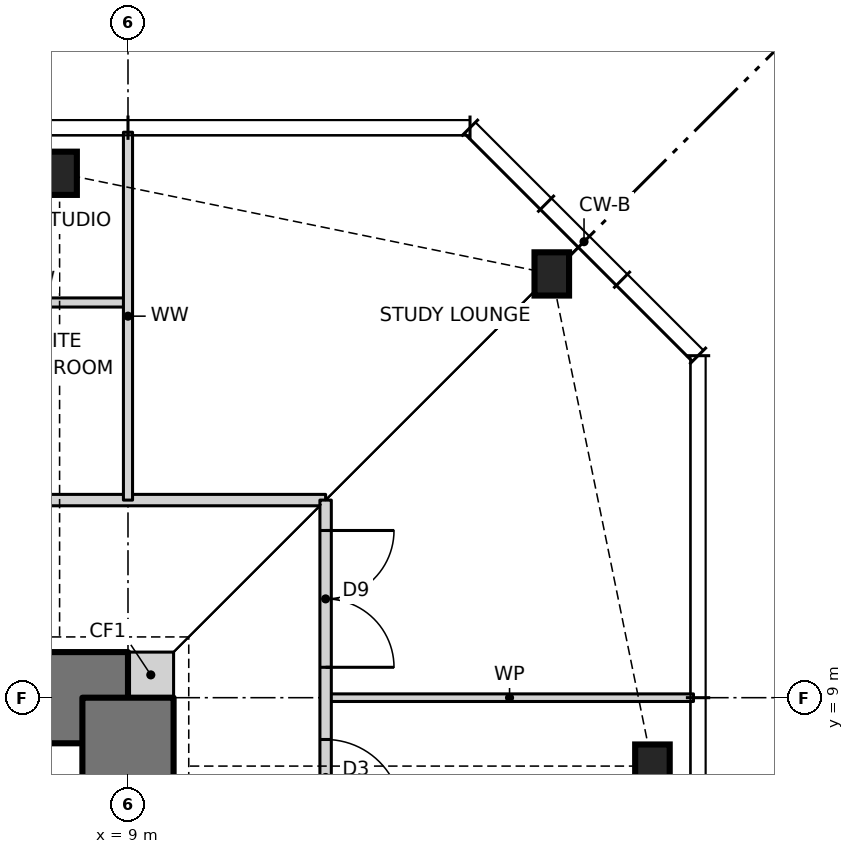
"""IFC4 building model, lengths in metres.
Left out: names, types, materials, properties, quantities, classifications, styles, units other than length and angle.
Written with IfcOpenShell. Run it as: python <this file> out.ifc"""

import sys

from ifc_helpers import new_model, si_unit, direction, frame, frame_2d, origin, origin_2d, place, context, subcontext, project, spatial, rectangle, i_section, extrude, element, fill, save


model = new_model("IFC4")
c1 = context("Model", 3, precision=1e-05, world=origin(), true_north=direction((0.0, 1.0)))
c2 = subcontext(c1, "Body", "Model", "MODEL_VIEW")
j1 = project(units=[si_unit("LENGTHUNIT", "METRE"), si_unit("PLANEANGLEUNIT", "RADIAN")], contexts=[c1])
p1 = place(None, origin())
s1 = spatial("IfcSite", under=j1, at=p1, CompositionType="ELEMENT")
p2 = place(p1, origin())
s2 = spatial("IfcBuilding", under=s1, at=p2, CompositionType="ELEMENT")
p3 = place(p2, frame((0.0, 0.0, 222.0)))
s3 = spatial("IfcBuildingStorey", under=s2, at=p3, CompositionType="ELEMENT", Elevation=222.0)
for number, where, z_axis, x_axis in (
    (1, (15.9, 8.1, 0.0), (0.0, 0.0, 1.0), (1.0, 0.0, 0.0)),
    (2, (14.576, 14.576, 0.0), (0.0, 0.0, 1.0), (1.0, 0.0, 0.0)),
    (3, (8.1, 15.9, 0.0), (0.0, 0.0, 1.0), (1.0, 0.0, 0.0)),
):
    element("IfcColumn", number, at=place(p3, frame(where, z_axis=z_axis, x_axis=x_axis)), inside=s3, PredefinedType="COLUMN", context=c2, shape_type="SweptSolid", body=[
        extrude(i_section(OverallWidth=0.455, OverallDepth=0.569, WebThickness=0.078, FlangeThickness=0.125, at=origin_2d()), origin(), (0.0, 0.0, 1.0), 3.5),
    ])
p4 = place(p3, frame((9.0, 9.3, 0.0), z_axis=(0.0, 0.0, 1.0), x_axis=(1.0, 0.0, 0.0)))
e4 = element("IfcWall", 4, at=p4, inside=s3, PredefinedType="SOLIDWALL", context=c2, shape_type="SweptSolid", body=[
    extrude(rectangle(XDim=0.6, YDim=0.6, at=frame_2d((0.3, 0.0))), origin(), (0.0, 0.0, 1.0), 3.5),
])
p5 = place(p3, frame((9.0, 9.0, 0.0), z_axis=(0.0, 0.0, 1.0), x_axis=(-1.0, 0.0, 0.0)))
e5 = element("IfcWall", 5, at=p5, inside=s3, PredefinedType="SHEAR", context=c2, shape_type="SweptSolid", body=[
    extrude(rectangle(XDim=18.0, YDim=1.2, at=frame_2d((9.0, 0.0))), origin(), (0.0, 0.0, 1.0), 3.5),
])
p6 = place(p5, frame((11.125, 0.0, 0.0)))
e6 = element("IfcOpeningElement", 6, at=p6, cuts=e5, PredefinedType="OPENING", context=c2, shape_type="SweptSolid", body=[
    extrude(rectangle(XDim=0.9, YDim=2.1, at=frame_2d((0.45, 1.05))), frame((0.0, 0.61, 0.0), z_axis=(0.0, -1.0, 0.0), x_axis=(1.0, 0.0, 0.0)), (0.0, 0.0, 1.0), 1.22),
])
p7 = place(p5, frame((4.275, 0.0, 0.0)))
e7 = element("IfcOpeningElement", 7, at=p7, cuts=e5, PredefinedType="OPENING", context=c2, shape_type="SweptSolid", body=[
    extrude(rectangle(XDim=0.9, YDim=2.1, at=frame_2d((0.45, 1.05))), frame((0.0, 0.61, 0.0), z_axis=(0.0, -1.0, 0.0), x_axis=(1.0, 0.0, 0.0)), (0.0, 0.0, 1.0), 1.22),
])
p8 = place(p3, frame((9.0, -9.0, 0.0), z_axis=(0.0, 0.0, 1.0), x_axis=(0.0, 1.0, 0.0)))
e8 = element("IfcWall", 8, at=p8, inside=s3, PredefinedType="SHEAR", context=c2, shape_type="SweptSolid", body=[
    extrude(rectangle(XDim=18.0, YDim=1.2, at=frame_2d((9.0, 0.0))), origin(), (0.0, 0.0, 1.0), 3.5),
])
p9 = place(p8, frame((8.5, 0.0, 0.0)))
e9 = element("IfcOpeningElement", 9, at=p9, cuts=e8, PredefinedType="OPENING", context=c2, shape_type="SweptSolid", body=[
    extrude(rectangle(XDim=1.0, YDim=2.1, at=frame_2d((0.5, 1.05))), frame((0.0, 0.61, 0.0), z_axis=(0.0, -1.0, 0.0), x_axis=(1.0, 0.0, 0.0)), (0.0, 0.0, 1.0), 1.22),
])
p10 = place(p3, frame((11.6, 9.0, 0.0), z_axis=(0.0, 0.0, 1.0), x_axis=(1.0, 0.0, 0.0)))
e10 = element("IfcWall", 10, at=p10, inside=s3, PredefinedType="PARTITIONING", context=c2, shape_type="SweptSolid", body=[
    extrude(rectangle(XDim=4.84, YDim=0.1, at=frame_2d((2.42, 0.0))), origin(), (0.0, 0.0, 1.0), 3.27),
])
p11 = place(p3, frame((-11.6, 11.6, 0.0), z_axis=(0.0, 0.0, 1.0), x_axis=(1.0, 0.0, 0.0)))
e11 = element("IfcWall", 11, at=p11, inside=s3, PredefinedType="PARTITIONING", context=c2, shape_type="SweptSolid", body=[
    extrude(rectangle(XDim=23.2, YDim=0.15, at=frame_2d((11.6, 0.0))), origin(), (0.0, 0.0, 1.0), 3.27),
])
p12 = place(p11, frame((16.65, 0.0, 0.0)))
e12 = element("IfcOpeningElement", 12, at=p12, cuts=e11, PredefinedType="OPENING", context=c2, shape_type="SweptSolid", body=[
    extrude(rectangle(XDim=1.0, YDim=2.1, at=frame_2d((0.5, 1.05))), frame((0.0, 0.085, 0.0), z_axis=(0.0, -1.0, 0.0), x_axis=(1.0, 0.0, 0.0)), (0.0, 0.0, 1.0), 0.17),
])
p13 = place(p11, frame((14.55, 0.0, 0.0)))
e13 = element("IfcOpeningElement", 13, at=p13, cuts=e11, PredefinedType="OPENING", context=c2, shape_type="SweptSolid", body=[
    extrude(rectangle(XDim=1.0, YDim=2.1, at=frame_2d((0.5, 1.05))), frame((0.0, 0.085, 0.0), z_axis=(0.0, -1.0, 0.0), x_axis=(1.0, 0.0, 0.0)), (0.0, 0.0, 1.0), 0.17),
])
p14 = place(p11, frame((7.65, 0.0, 0.0)))
e14 = element("IfcOpeningElement", 14, at=p14, cuts=e11, PredefinedType="OPENING", context=c2, shape_type="SweptSolid", body=[
    extrude(rectangle(XDim=1.0, YDim=2.1, at=frame_2d((0.5, 1.05))), frame((0.0, 0.085, 0.0), z_axis=(0.0, -1.0, 0.0), x_axis=(1.0, 0.0, 0.0)), (0.0, 0.0, 1.0), 0.17),
])
p15 = place(p11, frame((5.55, 0.0, 0.0)))
e15 = element("IfcOpeningElement", 15, at=p15, cuts=e11, PredefinedType="OPENING", context=c2, shape_type="SweptSolid", body=[
    extrude(rectangle(XDim=1.0, YDim=2.1, at=frame_2d((0.5, 1.05))), frame((0.0, 0.085, 0.0), z_axis=(0.0, -1.0, 0.0), x_axis=(1.0, 0.0, 0.0)), (0.0, 0.0, 1.0), 0.17),
])
p16 = place(p11, frame((0.4, 0.0, 0.0)))
e16 = element("IfcOpeningElement", 16, at=p16, cuts=e11, PredefinedType="OPENING", context=c2, shape_type="SweptSolid", body=[
    extrude(rectangle(XDim=1.8, YDim=2.1, at=frame_2d((0.9, 1.05))), frame((0.0, 0.085, 0.0), z_axis=(0.0, -1.0, 0.0), x_axis=(1.0, 0.0, 0.0)), (0.0, 0.0, 1.0), 0.17),
])
p17 = place(p3, frame((6.6, 14.2, 0.0), z_axis=(0.0, 0.0, 1.0), x_axis=(1.0, 0.0, 0.0)))
e17 = element("IfcWall", 17, at=p17, inside=s3, PredefinedType="PARTITIONING", context=c2, shape_type="SweptSolid", body=[
    extrude(rectangle(XDim=2.4, YDim=0.12, at=frame_2d((1.2, 0.0))), origin(), (0.0, 0.0, 1.0), 3.27),
])
p18 = place(p3, frame((11.6, -11.6, 0.0), z_axis=(0.0, 0.0, 1.0), x_axis=(0.0, 1.0, 0.0)))
e18 = element("IfcWall", 18, at=p18, inside=s3, PredefinedType="PARTITIONING", context=c2, shape_type="SweptSolid", body=[
    extrude(rectangle(XDim=23.2, YDim=0.15, at=frame_2d((11.6, 0.0))), origin(), (0.0, 0.0, 1.0), 3.27),
])
p19 = place(p18, frame((5.7, 0.0, 0.0)))
e19 = element("IfcOpeningElement", 19, at=p19, cuts=e18, PredefinedType="OPENING", context=c2, shape_type="SweptSolid", body=[
    extrude(rectangle(XDim=1.0, YDim=2.1, at=frame_2d((0.5, 1.05))), frame((0.0, 0.085, 0.0), z_axis=(0.0, -1.0, 0.0), x_axis=(1.0, 0.0, 0.0)), (0.0, 0.0, 1.0), 0.17),
])
p20 = place(p18, frame((12.15, 0.0, 0.0)))
e20 = element("IfcOpeningElement", 20, at=p20, cuts=e18, PredefinedType="OPENING", context=c2, shape_type="SweptSolid", body=[
    extrude(rectangle(XDim=1.0, YDim=2.1, at=frame_2d((0.5, 1.05))), frame((0.0, 0.085, 0.0), z_axis=(0.0, -1.0, 0.0), x_axis=(1.0, 0.0, 0.0)), (0.0, 0.0, 1.0), 0.17),
])
p21 = place(p18, frame((19.05, 0.0, 0.0)))
e21 = element("IfcOpeningElement", 21, at=p21, cuts=e18, PredefinedType="OPENING", context=c2, shape_type="SweptSolid", body=[
    extrude(rectangle(XDim=1.0, YDim=2.1, at=frame_2d((0.5, 1.05))), frame((0.0, 0.085, 0.0), z_axis=(0.0, -1.0, 0.0), x_axis=(1.0, 0.0, 0.0)), (0.0, 0.0, 1.0), 0.17),
])
p22 = place(p18, frame((21.0, 0.0, 0.0)))
e22 = element("IfcOpeningElement", 22, at=p22, cuts=e18, PredefinedType="OPENING", context=c2, shape_type="SweptSolid", body=[
    extrude(rectangle(XDim=1.8, YDim=2.1, at=frame_2d((0.9, 1.05))), frame((0.0, 0.085, 0.0), z_axis=(0.0, -1.0, 0.0), x_axis=(1.0, 0.0, 0.0)), (0.0, 0.0, 1.0), 0.17),
])
p23 = place(p3, frame((9.0, 11.6, 0.0), z_axis=(0.0, 0.0, 1.0), x_axis=(0.0, 1.0, 0.0)))
e23 = element("IfcWall", 23, at=p23, inside=s3, PredefinedType="PARTITIONING", context=c2, shape_type="SweptSolid", body=[
    extrude(rectangle(XDim=4.84, YDim=0.12, at=frame_2d((2.42, 0.0))), origin(), (0.0, 0.0, 1.0), 3.27),
])
p24 = place(p21, frame((1.0, 0.0, 0.0), z_axis=(0.0, 0.0, 1.0), x_axis=(-1.0, 0.0, 0.0)))
e24 = element("IfcDoor", 24, at=p24, inside=s3, OperationType="SINGLE_SWING_RIGHT", PredefinedType="DOOR", context=c2, shape_type="SweptSolid", body=[
    extrude(rectangle(XDim=1.0, YDim=2.1, at=frame_2d((0.5, 1.05))), frame((0.0, 0.025, 0.0), z_axis=(0.0, -1.0, 0.0), x_axis=(1.0, 0.0, 0.0)), (0.0, 0.0, 1.0), 0.05),
])
fill(e21, e24)
p25 = place(p22, frame((1.8, 0.0, 0.0), z_axis=(0.0, 0.0, 1.0), x_axis=(-1.0, 0.0, 0.0)))
e25 = element("IfcDoor", 25, at=p25, inside=s3, OperationType="DOUBLE_DOOR_SINGLE_SWING", PredefinedType="DOOR", context=c2, shape_type="SweptSolid", body=[
    extrude(rectangle(XDim=1.8, YDim=2.1, at=frame_2d((0.9, 1.05))), frame((0.0, 0.025, 0.0), z_axis=(0.0, -1.0, 0.0), x_axis=(1.0, 0.0, 0.0)), (0.0, 0.0, 1.0), 0.05),
])
fill(e22, e25)
save(model, sys.argv[1])
